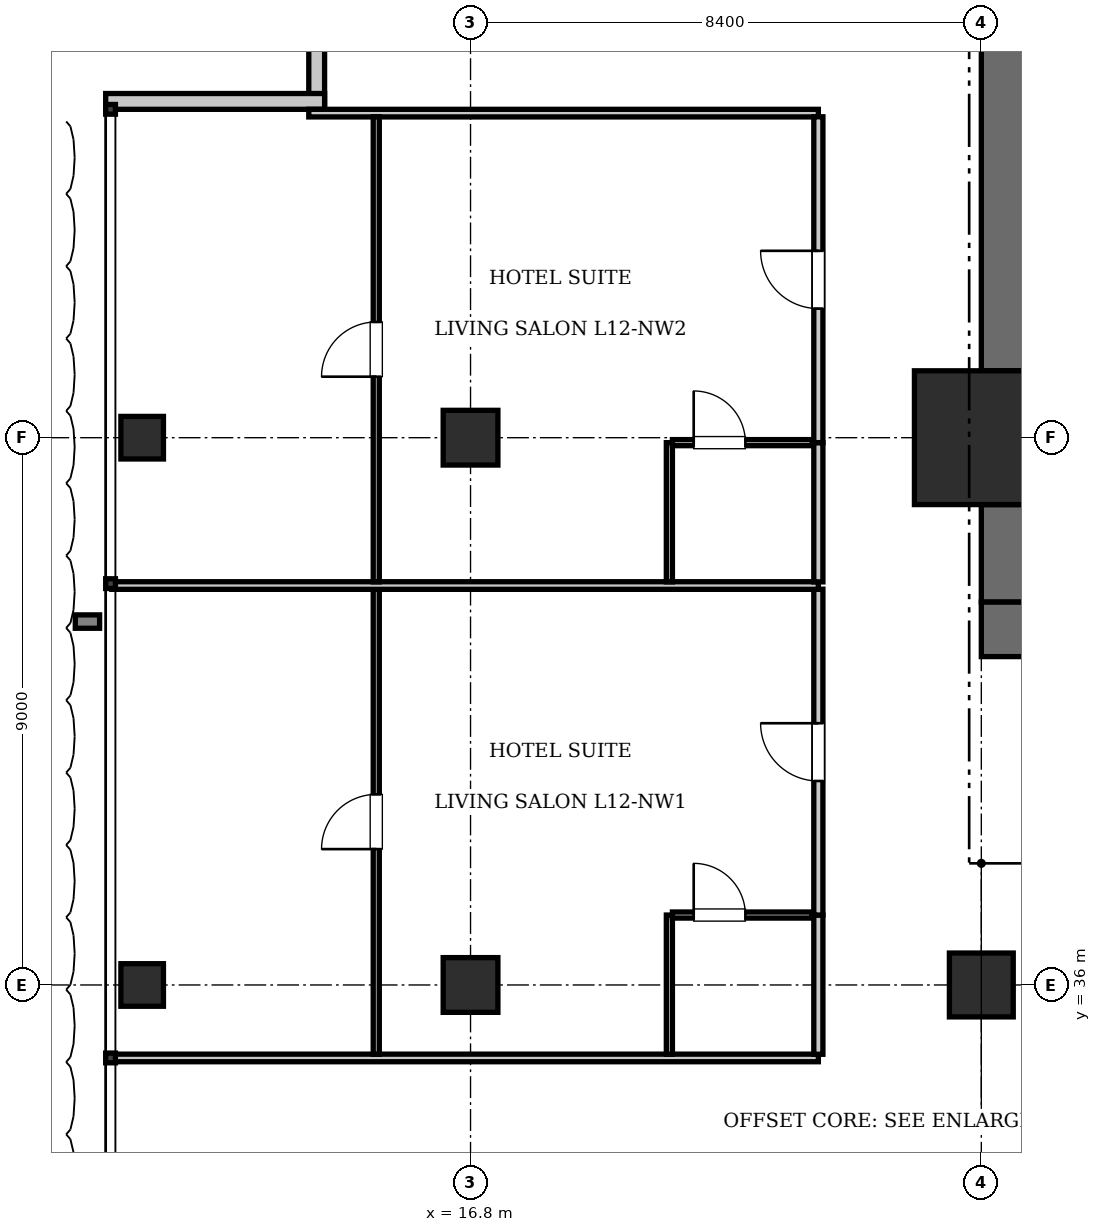
"""IFC4 building model, lengths in metres.
Left out: names, types, materials, properties, quantities, classifications, styles, units other than length and angle.
Written with IfcOpenShell. Run it as: python <this file> out.ifc"""

import sys

from ifc_helpers import new_model, si_unit, direction, frame, frame_2d, origin, origin_2d, place, context, subcontext, project, spatial, rectangle, i_section, extrude, element, fill, save


model = new_model("IFC4")
c1 = context("Model", 3, precision=1e-05, world=origin(), true_north=direction((0.0, 1.0)))
c2 = subcontext(c1, "Body", "Model", "MODEL_VIEW")
j1 = project(units=[si_unit("LENGTHUNIT", "METRE"), si_unit("PLANEANGLEUNIT", "RADIAN")], contexts=[c1])
p1 = place(None, origin())
s1 = spatial("IfcSite", under=j1, at=p1, CompositionType="ELEMENT")
p2 = place(p1, origin())
s2 = spatial("IfcBuilding", under=s1, at=p2, CompositionType="ELEMENT")
p3 = place(p2, frame((0.0, 0.0, 53.9)))
s3 = spatial("IfcBuildingStorey", under=s2, at=p3, CompositionType="ELEMENT", Elevation=53.9)
p4 = place(p3, frame((25.2, 45.0, 0.0), z_axis=(0.0, 0.0, 1.0), x_axis=(1.0, 0.0, 0.0)))
e1 = element("IfcColumn", 1, at=p4, inside=s3, PredefinedType="COLUMN", context=c2, shape_type="SweptSolid", body=[
    extrude(rectangle(XDim=2.2, YDim=2.2, at=origin_2d()), origin(), (0.0, 0.0, 1.0), 3.85),
])
p5 = place(p3, frame((25.2, 41.85, 0.0), z_axis=(0.0, 0.0, 1.0), x_axis=(1.0, 0.0, 0.0)))
e2 = element("IfcWall", 2, at=p5, inside=s3, PredefinedType="SHEAR", context=c2, shape_type="SweptSolid", body=[
    extrude(rectangle(XDim=6.8, YDim=0.9, at=frame_2d((3.4, 0.0))), origin(), (0.0, 0.0, 1.0), 3.85),
])
p6 = place(p5, frame((1.65, 0.0, 0.0)))
e3 = element("IfcOpeningElement", 3, at=p6, cuts=e2, PredefinedType="OPENING", context=c2, shape_type="SweptSolid", body=[
    extrude(rectangle(XDim=1.15, YDim=2.15, at=frame_2d((0.575, 1.075))), frame((0.0, 0.46, 0.0), z_axis=(0.0, -1.0, 0.0), x_axis=(1.0, 0.0, 0.0)), (0.0, 0.0, 1.0), 0.92),
])
p7 = place(p5, frame((5.15, 0.0, 0.0)))
e4 = element("IfcOpeningElement", 4, at=p7, cuts=e2, PredefinedType="OPENING", context=c2, shape_type="SweptSolid", body=[
    extrude(rectangle(XDim=1.1, YDim=2.2, at=frame_2d((0.55, 1.1))), frame((0.0, 0.46, 0.0), z_axis=(0.0, -1.0, 0.0), x_axis=(1.0, 0.0, 0.0)), (0.0, 0.0, 1.0), 0.92),
])
p8 = place(p3, frame((25.65, 42.3, 0.0), z_axis=(0.0, 0.0, 1.0), x_axis=(0.0, 1.0, 0.0)))
e5 = element("IfcWall", 5, at=p8, inside=s3, PredefinedType="SHEAR", context=c2, shape_type="SweptSolid", body=[
    extrude(rectangle(XDim=1.6, YDim=0.9, at=frame_2d((0.8, 0.0))), origin(), (0.0, 0.0, 1.0), 3.85),
])
p9 = place(p3, frame((25.65, 46.1, 0.0), z_axis=(0.0, 0.0, 1.0), x_axis=(0.0, 1.0, 0.0)))
e6 = element("IfcWall", 6, at=p9, inside=s3, PredefinedType="SHEAR", context=c2, shape_type="SweptSolid", body=[
    extrude(rectangle(XDim=7.0, YDim=0.9, at=frame_2d((3.5, 0.0))), origin(), (0.0, 0.0, 1.0), 3.85),
])
p10 = place(p3, frame((25.2, 36.0, 0.0), z_axis=(0.0, 0.0, 1.0), x_axis=(1.0, 0.0, 0.0)))
e7 = element("IfcColumn", 7, at=p10, inside=s3, PredefinedType="COLUMN", context=c2, shape_type="SweptSolid", body=[
    extrude(rectangle(XDim=1.05, YDim=1.05, at=origin_2d()), origin(), (0.0, 0.0, 1.0), 3.85),
])
for number, where, z_axis, x_axis in (
    (8, (16.8, 36.0, 0.0), (0.0, 0.0, 1.0), (1.0, 0.0, 0.0)),
    (9, (16.8, 45.0, 0.0), (0.0, 0.0, 1.0), (1.0, 0.0, 0.0)),
):
    element("IfcColumn", number, at=place(p3, frame(where, z_axis=z_axis, x_axis=x_axis)), inside=s3, PredefinedType="COLUMN", context=c2, shape_type="SweptSolid", body=[
        extrude(rectangle(XDim=0.9, YDim=0.9, at=origin_2d()), origin(), (0.0, 0.0, 1.0), 3.85),
    ])
for number, where, z_axis, x_axis in (
    (10, (11.4, 36.0, 0.0), (0.0, 0.0, 1.0), (1.0, 0.0, 0.0)),
    (11, (11.4, 45.0, 0.0), (0.0, 0.0, 1.0), (1.0, 0.0, 0.0)),
):
    element("IfcColumn", number, at=place(p3, frame(where, z_axis=z_axis, x_axis=x_axis)), inside=s3, PredefinedType="COLUMN", context=c2, shape_type="SweptSolid", body=[
        extrude(i_section(OverallWidth=0.7, OverallDepth=0.7, WebThickness=0.028, FlangeThickness=0.044, at=origin_2d()), origin(), (0.0, 0.0, 1.0), 3.85),
    ])
p11 = place(p3, frame((14.27, 50.4, 0.0), z_axis=(0.0, 0.0, 1.0), x_axis=(0.0, 1.0, 0.0)))
e12 = element("IfcWall", 12, at=p11, inside=s3, PredefinedType="SOLIDWALL", context=c2, shape_type="SweptSolid", body=[
    extrude(rectangle(XDim=3.6, YDim=0.26, at=frame_2d((1.8, 0.0))), origin(), (0.0, 0.0, 1.0), 3.61),
])
p12 = place(p3, frame((10.8, 50.53, 0.0), z_axis=(0.0, 0.0, 1.0), x_axis=(1.0, 0.0, 0.0)))
e13 = element("IfcWall", 13, at=p12, inside=s3, PredefinedType="SOLIDWALL", context=c2, shape_type="SweptSolid", body=[
    extrude(rectangle(XDim=3.6, YDim=0.26, at=frame_2d((1.8, 0.0))), origin(), (0.0, 0.0, 1.0), 3.61),
])
p13 = place(p3, frame((10.9, 34.8, 0.0), z_axis=(0.0, 0.0, 1.0), x_axis=(1.0, 0.0, 0.0)))
e14 = element("IfcWall", 14, at=p13, inside=s3, PredefinedType="PARTITIONING", context=c2, shape_type="SweptSolid", body=[
    extrude(rectangle(XDim=11.62, YDim=0.125, at=frame_2d((5.81, 0.0))), origin(), (0.0, 0.0, 1.0), 3.61),
])
p14 = place(p3, frame((14.14, 50.337, 0.0), z_axis=(0.0, 0.0, 1.0), x_axis=(1.0, 0.0, 0.0)))
e15 = element("IfcWall", 15, at=p14, inside=s3, PredefinedType="PARTITIONING", context=c2, shape_type="SweptSolid", body=[
    extrude(rectangle(XDim=8.38, YDim=0.125, at=frame_2d((4.19, 0.0))), origin(), (0.0, 0.0, 1.0), 3.61),
])
p15 = place(p3, frame((22.52, 34.86, 0.0), z_axis=(0.0, 0.0, 1.0), x_axis=(0.0, 1.0, 0.0)))
e16 = element("IfcWall", 16, at=p15, inside=s3, PredefinedType="PARTITIONING", context=c2, shape_type="SweptSolid", body=[
    extrude(rectangle(XDim=2.29, YDim=0.15, at=frame_2d((1.145, 0.0))), origin(), (0.0, 0.0, 1.0), 3.61),
])
p16 = place(p3, frame((22.52, 37.15, 0.0), z_axis=(0.0, 0.0, 1.0), x_axis=(0.0, 1.0, 0.0)))
e17 = element("IfcWall", 17, at=p16, inside=s3, PredefinedType="PARTITIONING", context=c2, shape_type="SweptSolid", body=[
    extrude(rectangle(XDim=5.359, YDim=0.15, at=frame_2d((2.679, 0.0))), origin(), (0.0, 0.0, 1.0), 3.61),
])
p17 = place(p16, frame((2.204, 0.0, 0.0)))
e18 = element("IfcOpeningElement", 18, at=p17, cuts=e17, PredefinedType="OPENING", context=c2, shape_type="SweptSolid", body=[
    extrude(rectangle(XDim=0.95, YDim=2.15, at=frame_2d((0.475, 1.075))), frame((0.0, 0.085, 0.0), z_axis=(0.0, -1.0, 0.0), x_axis=(1.0, 0.0, 0.0)), (0.0, 0.0, 1.0), 0.17),
])
p18 = place(p3, frame((20.07, 34.86, 0.0), z_axis=(0.0, 0.0, 1.0), x_axis=(0.0, 1.0, 0.0)))
e19 = element("IfcWall", 19, at=p18, inside=s3, PredefinedType="PARTITIONING", context=c2, shape_type="SweptSolid", body=[
    extrude(rectangle(XDim=2.29, YDim=0.1, at=frame_2d((1.145, 0.0))), origin(), (0.0, 0.0, 1.0), 3.61),
])
p19 = place(p3, frame((20.12, 37.15, 0.0), z_axis=(0.0, 0.0, 1.0), x_axis=(1.0, 0.0, 0.0)))
e20 = element("IfcWall", 20, at=p19, inside=s3, PredefinedType="PARTITIONING", context=c2, shape_type="SweptSolid", body=[
    extrude(rectangle(XDim=2.3, YDim=0.1, at=frame_2d((1.15, 0.0))), origin(), (0.0, 0.0, 1.0), 3.61),
])
p20 = place(p19, frame((0.35, 0.0, 0.0)))
e21 = element("IfcOpeningElement", 21, at=p20, cuts=e20, PredefinedType="OPENING", context=c2, shape_type="SweptSolid", body=[
    extrude(rectangle(XDim=0.85, YDim=2.1, at=frame_2d((0.425, 1.05))), frame((0.0, 0.06, 0.0), z_axis=(0.0, -1.0, 0.0), x_axis=(1.0, 0.0, 0.0)), (0.0, 0.0, 1.0), 0.12),
])
p21 = place(p3, frame((15.25, 34.86, 0.0), z_axis=(0.0, 0.0, 1.0), x_axis=(0.0, 1.0, 0.0)))
e22 = element("IfcWall", 22, at=p21, inside=s3, PredefinedType="PARTITIONING", context=c2, shape_type="SweptSolid", body=[
    extrude(rectangle(XDim=7.649, YDim=0.1, at=frame_2d((3.824, 0.0))), origin(), (0.0, 0.0, 1.0), 3.61),
])
p22 = place(p21, frame((3.374, 0.0, 0.0)))
e23 = element("IfcOpeningElement", 23, at=p22, cuts=e22, PredefinedType="OPENING", context=c2, shape_type="SweptSolid", body=[
    extrude(rectangle(XDim=0.9, YDim=2.1, at=frame_2d((0.45, 1.05))), frame((0.0, 0.06, 0.0), z_axis=(0.0, -1.0, 0.0), x_axis=(1.0, 0.0, 0.0)), (0.0, 0.0, 1.0), 0.12),
])
p23 = place(p3, frame((10.9, 42.569, 0.0), z_axis=(0.0, 0.0, 1.0), x_axis=(1.0, 0.0, 0.0)))
e24 = element("IfcWall", 24, at=p23, inside=s3, PredefinedType="PARTITIONING", context=c2, shape_type="SweptSolid", body=[
    extrude(rectangle(XDim=11.62, YDim=0.125, at=frame_2d((5.81, 0.0))), origin(), (0.0, 0.0, 1.0), 3.61),
])
p24 = place(p3, frame((22.52, 42.629, 0.0), z_axis=(0.0, 0.0, 1.0), x_axis=(0.0, 1.0, 0.0)))
e25 = element("IfcWall", 25, at=p24, inside=s3, PredefinedType="PARTITIONING", context=c2, shape_type="SweptSolid", body=[
    extrude(rectangle(XDim=2.29, YDim=0.15, at=frame_2d((1.145, 0.0))), origin(), (0.0, 0.0, 1.0), 3.61),
])
p25 = place(p3, frame((22.52, 44.919, 0.0), z_axis=(0.0, 0.0, 1.0), x_axis=(0.0, 1.0, 0.0)))
e26 = element("IfcWall", 26, at=p25, inside=s3, PredefinedType="PARTITIONING", context=c2, shape_type="SweptSolid", body=[
    extrude(rectangle(XDim=5.359, YDim=0.15, at=frame_2d((2.679, 0.0))), origin(), (0.0, 0.0, 1.0), 3.61),
])
p26 = place(p25, frame((2.204, 0.0, 0.0)))
e27 = element("IfcOpeningElement", 27, at=p26, cuts=e26, PredefinedType="OPENING", context=c2, shape_type="SweptSolid", body=[
    extrude(rectangle(XDim=0.95, YDim=2.15, at=frame_2d((0.475, 1.075))), frame((0.0, 0.085, 0.0), z_axis=(0.0, -1.0, 0.0), x_axis=(1.0, 0.0, 0.0)), (0.0, 0.0, 1.0), 0.17),
])
p27 = place(p3, frame((20.07, 42.629, 0.0), z_axis=(0.0, 0.0, 1.0), x_axis=(0.0, 1.0, 0.0)))
e28 = element("IfcWall", 28, at=p27, inside=s3, PredefinedType="PARTITIONING", context=c2, shape_type="SweptSolid", body=[
    extrude(rectangle(XDim=2.29, YDim=0.1, at=frame_2d((1.145, 0.0))), origin(), (0.0, 0.0, 1.0), 3.61),
])
p28 = place(p3, frame((20.12, 44.919, 0.0), z_axis=(0.0, 0.0, 1.0), x_axis=(1.0, 0.0, 0.0)))
e29 = element("IfcWall", 29, at=p28, inside=s3, PredefinedType="PARTITIONING", context=c2, shape_type="SweptSolid", body=[
    extrude(rectangle(XDim=2.3, YDim=0.1, at=frame_2d((1.15, 0.0))), origin(), (0.0, 0.0, 1.0), 2.988),
])
p29 = place(p28, frame((0.35, 0.0, 0.0)))
e30 = element("IfcOpeningElement", 30, at=p29, cuts=e29, PredefinedType="OPENING", context=c2, shape_type="SweptSolid", body=[
    extrude(rectangle(XDim=0.85, YDim=2.1, at=frame_2d((0.425, 1.05))), frame((0.0, 0.06, 0.0), z_axis=(0.0, -1.0, 0.0), x_axis=(1.0, 0.0, 0.0)), (0.0, 0.0, 1.0), 0.12),
])
p30 = place(p3, frame((15.25, 42.629, 0.0), z_axis=(0.0, 0.0, 1.0), x_axis=(0.0, 1.0, 0.0)))
e31 = element("IfcWall", 31, at=p30, inside=s3, PredefinedType="PARTITIONING", context=c2, shape_type="SweptSolid", body=[
    extrude(rectangle(XDim=7.649, YDim=0.1, at=frame_2d((3.824, 0.0))), origin(), (0.0, 0.0, 1.0), 3.61),
])
p31 = place(p30, frame((3.375, 0.0, 0.0)))
e32 = element("IfcOpeningElement", 32, at=p31, cuts=e31, PredefinedType="OPENING", context=c2, shape_type="SweptSolid", body=[
    extrude(rectangle(XDim=0.9, YDim=2.1, at=frame_2d((0.45, 1.05))), frame((0.0, 0.06, 0.0), z_axis=(0.0, -1.0, 0.0), x_axis=(1.0, 0.0, 0.0)), (0.0, 0.0, 1.0), 0.12),
])
p32 = place(p20, origin())
e33 = element("IfcDoor", 33, at=p32, inside=s3, OperationType="SINGLE_SWING_LEFT", PredefinedType="DOOR", context=c2, shape_type="SweptSolid", body=[
    extrude(rectangle(XDim=0.85, YDim=2.1, at=frame_2d((0.425, 1.05))), frame((0.0, 0.025, 0.0), z_axis=(0.0, -1.0, 0.0), x_axis=(1.0, 0.0, 0.0)), (0.0, 0.0, 1.0), 0.05),
])
fill(e21, e33)
p33 = place(p17, origin())
e34 = element("IfcDoor", 34, at=p33, inside=s3, OperationType="SINGLE_SWING_RIGHT", PredefinedType="DOOR", context=c2, shape_type="SweptSolid", body=[
    extrude(rectangle(XDim=0.95, YDim=2.15, at=frame_2d((0.475, 1.075))), frame((0.0, 0.025, 0.0), z_axis=(0.0, -1.0, 0.0), x_axis=(1.0, 0.0, 0.0)), (0.0, 0.0, 1.0), 0.05),
])
fill(e18, e34)
p34 = place(p22, origin())
e35 = element("IfcDoor", 35, at=p34, inside=s3, OperationType="SINGLE_SWING_LEFT", PredefinedType="DOOR", context=c2, shape_type="SweptSolid", body=[
    extrude(rectangle(XDim=0.9, YDim=2.1, at=frame_2d((0.45, 1.05))), frame((0.0, 0.025, 0.0), z_axis=(0.0, -1.0, 0.0), x_axis=(1.0, 0.0, 0.0)), (0.0, 0.0, 1.0), 0.05),
])
fill(e23, e35)
p35 = place(p29, origin())
e36 = element("IfcDoor", 36, at=p35, inside=s3, OperationType="SINGLE_SWING_LEFT", PredefinedType="DOOR", context=c2, shape_type="SweptSolid", body=[
    extrude(rectangle(XDim=0.85, YDim=2.1, at=frame_2d((0.425, 1.05))), frame((0.0, 0.025, 0.0), z_axis=(0.0, -1.0, 0.0), x_axis=(1.0, 0.0, 0.0)), (0.0, 0.0, 1.0), 0.05),
])
fill(e30, e36)
p36 = place(p26, origin())
e37 = element("IfcDoor", 37, at=p36, inside=s3, OperationType="SINGLE_SWING_RIGHT", PredefinedType="DOOR", context=c2, shape_type="SweptSolid", body=[
    extrude(rectangle(XDim=0.95, YDim=2.15, at=frame_2d((0.475, 1.075))), frame((0.0, 0.025, 0.0), z_axis=(0.0, -1.0, 0.0), x_axis=(1.0, 0.0, 0.0)), (0.0, 0.0, 1.0), 0.05),
])
fill(e27, e37)
p37 = place(p31, origin())
e38 = element("IfcDoor", 38, at=p37, inside=s3, OperationType="SINGLE_SWING_LEFT", PredefinedType="DOOR", context=c2, shape_type="SweptSolid", body=[
    extrude(rectangle(XDim=0.9, YDim=2.1, at=frame_2d((0.45, 1.05))), frame((0.0, 0.025, 0.0), z_axis=(0.0, -1.0, 0.0), x_axis=(1.0, 0.0, 0.0)), (0.0, 0.0, 1.0), 0.05),
])
fill(e32, e38)
save(model, sys.argv[1])
